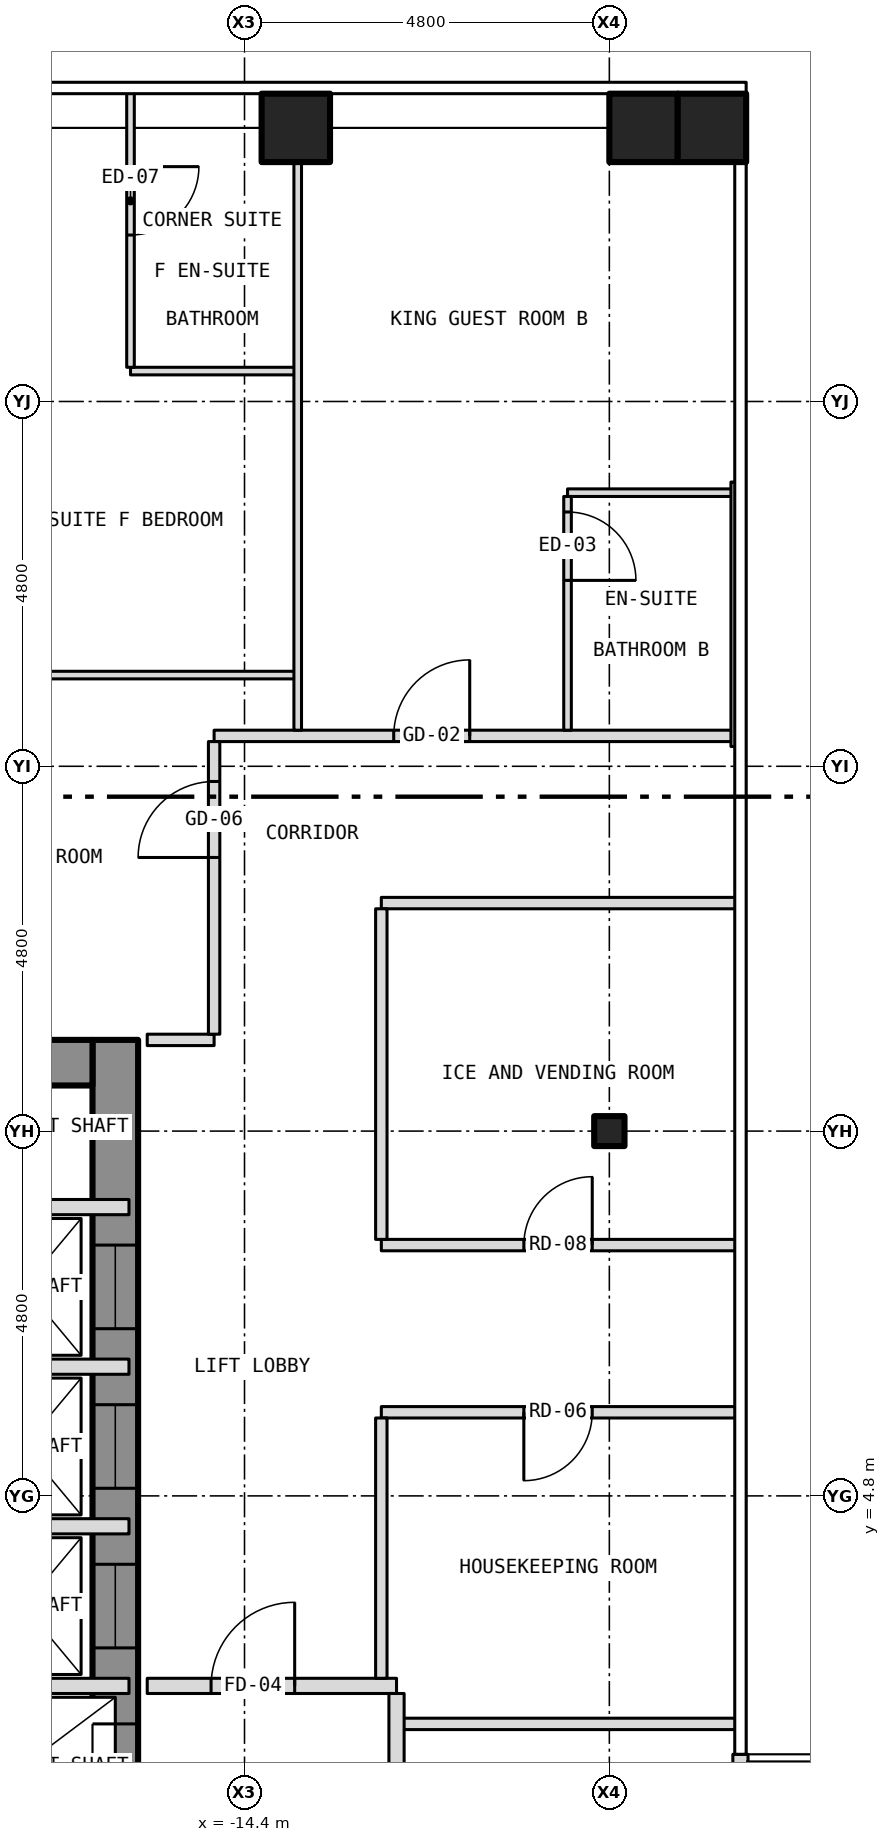
"""IFC4 building model, lengths in metres.
Left out: names, types, materials, properties, quantities, classifications, styles, units other than length and angle.
Written with IfcOpenShell. Run it as: python <this file> out.ifc"""

import sys

from ifc_helpers import new_model, si_unit, direction, frame, frame_2d, origin, origin_2d, place, context, subcontext, project, spatial, rectangle, hollow_rectangle, i_section, extrude, element, fill, save


model = new_model("IFC4")
c1 = context("Model", 3, precision=1e-05, world=origin(), true_north=direction((0.0, 1.0)))
c2 = subcontext(c1, "Body", "Model", "MODEL_VIEW")
j1 = project(units=[si_unit("LENGTHUNIT", "METRE"), si_unit("PLANEANGLEUNIT", "RADIAN")], contexts=[c1])
p1 = place(None, origin())
s1 = spatial("IfcSite", under=j1, at=p1, CompositionType="ELEMENT")
p2 = place(p1, origin())
s2 = spatial("IfcBuilding", under=s1, at=p2, CompositionType="ELEMENT")
p3 = place(p2, frame((0.0, 0.0, 127.5)))
s3 = spatial("IfcBuildingStorey", under=s2, at=p3, CompositionType="ELEMENT", Elevation=127.5)
for number, where, z_axis, x_axis in (
    (1, (-13.725, 22.8, -0.15), (0.0, 0.0, 1.0), (1.0, 0.0, 0.0)),
    (2, (-9.15, 22.8, -0.15), (0.0, 0.0, 1.0), (1.0, 0.0, 0.0)),
    (3, (-8.25, 22.8, -0.15), (0.0, 0.0, 1.0), (1.0, 0.0, 0.0)),
):
    element("IfcColumn", number, at=place(p3, frame(where, z_axis=z_axis, x_axis=x_axis)), inside=s3, PredefinedType="COLUMN", context=c2, shape_type="SweptSolid", body=[
        extrude(hollow_rectangle(XDim=0.9, YDim=0.9, WallThickness=0.05, at=origin_2d()), origin(), (0.0, 0.0, 1.0), 3.5),
    ])
p4 = place(p3, frame((-9.6, 9.6, -0.15), z_axis=(0.0, 0.0, 1.0), x_axis=(1.0, 0.0, 0.0)))
e4 = element("IfcColumn", 4, at=p4, inside=s3, PredefinedType="COLUMN", context=c2, shape_type="SweptSolid", body=[
    extrude(i_section(OverallWidth=0.399, OverallDepth=0.394, WebThickness=0.023, FlangeThickness=0.037, at=origin_2d()), origin(), (0.0, 0.0, 1.0), 3.5),
])
p5 = place(p3, frame((-16.1, -10.8, 0.0), z_axis=(0.0, 0.0, 1.0), x_axis=(0.0, 1.0, 0.0)))
e5 = element("IfcWall", 5, at=p5, inside=s3, PredefinedType="SHEAR", context=c2, shape_type="SweptSolid", body=[
    extrude(rectangle(XDim=21.6, YDim=0.6, at=frame_2d((10.8, 0.0))), origin(), (0.0, 0.0, 1.0), 3.25),
])
p6 = place(p5, frame((9.4, 0.0, 0.0)))
e6 = element("IfcOpeningElement", 6, at=p6, cuts=e5, PredefinedType="OPENING", context=c2, shape_type="SweptSolid", body=[
    extrude(rectangle(XDim=1.1, YDim=2.1, at=frame_2d((0.55, 1.05))), frame((0.0, 0.312, 0.0), z_axis=(0.0, -1.0, 0.0), x_axis=(1.0, 0.0, 0.0)), (0.0, 0.0, 1.0), 0.624),
])
p7 = place(p5, frame((11.5, 0.0, 0.0)))
e7 = element("IfcOpeningElement", 7, at=p7, cuts=e5, PredefinedType="OPENING", context=c2, shape_type="SweptSolid", body=[
    extrude(rectangle(XDim=1.1, YDim=2.1, at=frame_2d((0.55, 1.05))), frame((0.0, 0.312, 0.0), z_axis=(0.0, -1.0, 0.0), x_axis=(1.0, 0.0, 0.0)), (0.0, 0.0, 1.0), 0.624),
])
p8 = place(p5, frame((13.6, 0.0, 0.0)))
e8 = element("IfcOpeningElement", 8, at=p8, cuts=e5, PredefinedType="OPENING", context=c2, shape_type="SweptSolid", body=[
    extrude(rectangle(XDim=1.1, YDim=2.1, at=frame_2d((0.55, 1.05))), frame((0.0, 0.312, 0.0), z_axis=(0.0, -1.0, 0.0), x_axis=(1.0, 0.0, 0.0)), (0.0, 0.0, 1.0), 0.624),
])
p9 = place(p5, frame((15.7, 0.0, 0.0)))
e9 = element("IfcOpeningElement", 9, at=p9, cuts=e5, PredefinedType="OPENING", context=c2, shape_type="SweptSolid", body=[
    extrude(rectangle(XDim=1.1, YDim=2.1, at=frame_2d((0.55, 1.05))), frame((0.0, 0.312, 0.0), z_axis=(0.0, -1.0, 0.0), x_axis=(1.0, 0.0, 0.0)), (0.0, 0.0, 1.0), 0.624),
])
p10 = place(p5, frame((17.8, 0.0, 0.0)))
e10 = element("IfcOpeningElement", 10, at=p10, cuts=e5, PredefinedType="OPENING", context=c2, shape_type="SweptSolid", body=[
    extrude(rectangle(XDim=1.1, YDim=2.1, at=frame_2d((0.55, 1.05))), frame((0.0, 0.312, 0.0), z_axis=(0.0, -1.0, 0.0), x_axis=(1.0, 0.0, 0.0)), (0.0, 0.0, 1.0), 0.624),
])
p11 = place(p5, frame((0.758, 0.0, 0.0)))
e11 = element("IfcOpeningElement", 11, at=p11, cuts=e5, PredefinedType="OPENING", context=c2, shape_type="SweptSolid", body=[
    extrude(rectangle(XDim=1.1, YDim=2.1, at=frame_2d((0.55, 1.05))), frame((0.0, 0.312, 0.0), z_axis=(0.0, -1.0, 0.0), x_axis=(1.0, 0.0, 0.0)), (0.0, 0.0, 1.0), 0.624),
])
p12 = place(p5, frame((7.5, 0.0, 0.0)))
e12 = element("IfcOpeningElement", 12, at=p12, cuts=e5, PredefinedType="OPENING", context=c2, shape_type="SweptSolid", body=[
    extrude(rectangle(XDim=1.1, YDim=2.1, at=frame_2d((0.55, 1.05))), frame((0.0, 0.312, 0.0), z_axis=(0.0, -1.0, 0.0), x_axis=(1.0, 0.0, 0.0)), (0.0, 0.0, 1.0), 0.624),
])
p13 = place(p3, frame((-22.2, 10.5, 0.0), z_axis=(0.0, 0.0, 1.0), x_axis=(1.0, 0.0, 0.0)))
e13 = element("IfcWall", 13, at=p13, inside=s3, PredefinedType="SHEAR", context=c2, shape_type="SweptSolid", body=[
    extrude(rectangle(XDim=5.8, YDim=0.6, at=frame_2d((2.9, 0.0))), origin(), (0.0, 0.0, 1.0), 3.25),
])
p14 = place(p3, frame((-7.875, -1.4, 0.0), z_axis=(0.0, 0.0, 1.0), x_axis=(0.0, 1.0, 0.0)))
e14 = element("IfcWall", 14, at=p14, inside=s3, PredefinedType="SOLIDWALL", context=c2, shape_type="SweptSolid", body=[
    extrude(rectangle(XDim=2.8, YDim=0.2, at=frame_2d((1.4, 0.0))), origin(), (0.0, 0.0, 1.0), 3.5),
])
p15 = place(p14, frame((0.5, 0.0, 0.0)))
e15 = element("IfcOpeningElement", 15, at=p15, cuts=e14, PredefinedType="OPENING", context=c2, shape_type="SweptSolid", body=[
    extrude(rectangle(XDim=1.8, YDim=2.1, at=frame_2d((0.9, 1.05))), frame((0.0, 0.112, 0.0), z_axis=(0.0, -1.0, 0.0), x_axis=(1.0, 0.0, 0.0)), (0.0, 0.0, 1.0), 0.224),
])
p16 = place(p3, frame((-12.4, 1.8, 0.0), z_axis=(0.0, 0.0, 1.0), x_axis=(1.0, 0.0, 0.0)))
e16 = element("IfcWall", 16, at=p16, inside=s3, PredefinedType="PARTITIONING", context=c2, shape_type="SweptSolid", body=[
    extrude(rectangle(XDim=4.48, YDim=0.15, at=frame_2d((2.24, 0.0))), origin(), (0.0, 0.0, 1.0), 3.35),
])
p17 = place(p3, frame((-18.8, 2.3, 0.0), z_axis=(0.0, 0.0, 1.0), x_axis=(1.0, 0.0, 0.0)))
e17 = element("IfcWall", 17, at=p17, inside=s3, PredefinedType="PARTITIONING", context=c2, shape_type="SweptSolid", body=[
    extrude(rectangle(XDim=2.88, YDim=0.2, at=frame_2d((1.44, 0.0))), origin(), (0.0, 0.0, 1.0), 3.25),
])
p18 = place(p3, frame((-15.68, 2.3, 0.0), z_axis=(0.0, 0.0, 1.0), x_axis=(1.0, 0.0, 0.0)))
e18 = element("IfcWall", 18, at=p18, inside=s3, PredefinedType="PARTITIONING", context=c2, shape_type="SweptSolid", body=[
    extrude(rectangle(XDim=3.28, YDim=0.2, at=frame_2d((1.64, 0.0))), origin(), (0.0, 0.0, 1.0), 3.35),
])
p19 = place(p18, frame((0.84, 0.0, 0.0)))
e19 = element("IfcOpeningElement", 19, at=p19, cuts=e18, PredefinedType="OPENING", context=c2, shape_type="SweptSolid", body=[
    extrude(rectangle(XDim=1.1, YDim=2.1, at=frame_2d((0.55, 1.05))), frame((0.0, 0.112, 0.0), z_axis=(0.0, -1.0, 0.0), x_axis=(1.0, 0.0, 0.0)), (0.0, 0.0, 1.0), 0.224),
])
p20 = place(p3, frame((-18.8, 4.4, 0.0), z_axis=(0.0, 0.0, 1.0), x_axis=(1.0, 0.0, 0.0)))
e20 = element("IfcWall", 20, at=p20, inside=s3, PredefinedType="PARTITIONING", context=c2, shape_type="SweptSolid", body=[
    extrude(rectangle(XDim=2.88, YDim=0.2, at=frame_2d((1.44, 0.0))), origin(), (0.0, 0.0, 1.0), 3.25),
])
p21 = place(p3, frame((-12.6, 5.9, 0.0), z_axis=(0.0, 0.0, 1.0), x_axis=(1.0, 0.0, 0.0)))
e21 = element("IfcWall", 21, at=p21, inside=s3, PredefinedType="PARTITIONING", context=c2, shape_type="SweptSolid", body=[
    extrude(rectangle(XDim=4.68, YDim=0.15, at=frame_2d((2.34, 0.0))), origin(), (0.0, 0.0, 1.0), 3.35),
])
p22 = place(p21, frame((1.875, 0.0, 0.0)))
e22 = element("IfcOpeningElement", 22, at=p22, cuts=e21, PredefinedType="OPENING", context=c2, shape_type="SweptSolid", body=[
    extrude(rectangle(XDim=0.9, YDim=2.1, at=frame_2d((0.45, 1.05))), frame((0.0, 0.087, 0.0), z_axis=(0.0, -1.0, 0.0), x_axis=(1.0, 0.0, 0.0)), (0.0, 0.0, 1.0), 0.174),
])
p23 = place(p3, frame((-18.8, 6.5, 0.0), z_axis=(0.0, 0.0, 1.0), x_axis=(1.0, 0.0, 0.0)))
e23 = element("IfcWall", 23, at=p23, inside=s3, PredefinedType="PARTITIONING", context=c2, shape_type="SweptSolid", body=[
    extrude(rectangle(XDim=2.88, YDim=0.2, at=frame_2d((1.44, 0.0))), origin(), (0.0, 0.0, 1.0), 3.25),
])
p24 = place(p3, frame((-12.6, 8.1, 0.0), z_axis=(0.0, 0.0, 1.0), x_axis=(1.0, 0.0, 0.0)))
e24 = element("IfcWall", 24, at=p24, inside=s3, PredefinedType="PARTITIONING", context=c2, shape_type="SweptSolid", body=[
    extrude(rectangle(XDim=4.68, YDim=0.15, at=frame_2d((2.34, 0.0))), origin(), (0.0, 0.0, 1.0), 3.35),
])
p25 = place(p24, frame((1.875, 0.0, 0.0)))
e25 = element("IfcOpeningElement", 25, at=p25, cuts=e24, PredefinedType="OPENING", context=c2, shape_type="SweptSolid", body=[
    extrude(rectangle(XDim=0.9, YDim=2.1, at=frame_2d((0.45, 1.05))), frame((0.0, 0.087, 0.0), z_axis=(0.0, -1.0, 0.0), x_axis=(1.0, 0.0, 0.0)), (0.0, 0.0, 1.0), 0.174),
])
p26 = place(p3, frame((-18.8, 8.6, 0.0), z_axis=(0.0, 0.0, 1.0), x_axis=(1.0, 0.0, 0.0)))
e26 = element("IfcWall", 26, at=p26, inside=s3, PredefinedType="PARTITIONING", context=c2, shape_type="SweptSolid", body=[
    extrude(rectangle(XDim=2.88, YDim=0.2, at=frame_2d((1.44, 0.0))), origin(), (0.0, 0.0, 1.0), 3.25),
])
p27 = place(p3, frame((-15.68, 10.8, 0.0), z_axis=(0.0, 0.0, 1.0), x_axis=(1.0, 0.0, 0.0)))
e27 = element("IfcWall", 27, at=p27, inside=s3, PredefinedType="PARTITIONING", context=c2, shape_type="SweptSolid", body=[
    extrude(rectangle(XDim=0.88, YDim=0.15, at=frame_2d((0.44, 0.0))), origin(), (0.0, 0.0, 1.0), 3.35),
])
p28 = place(p3, frame((-12.6, 12.6, 0.0), z_axis=(0.0, 0.0, 1.0), x_axis=(1.0, 0.0, 0.0)))
e28 = element("IfcWall", 28, at=p28, inside=s3, PredefinedType="PARTITIONING", context=c2, shape_type="SweptSolid", body=[
    extrude(rectangle(XDim=4.68, YDim=0.15, at=frame_2d((2.34, 0.0))), origin(), (0.0, 0.0, 1.0), 3.35),
])
p29 = place(p3, frame((-14.8, 14.8, 0.0), z_axis=(0.0, 0.0, 1.0), x_axis=(1.0, 0.0, 0.0)))
e29 = element("IfcWall", 29, at=p29, inside=s3, PredefinedType="PARTITIONING", context=c2, shape_type="SweptSolid", body=[
    extrude(rectangle(XDim=6.85, YDim=0.15, at=frame_2d((3.425, 0.0))), origin(), (0.0, 0.0, 1.0), 3.35),
])
p30 = place(p29, frame((2.363, 0.0, 0.0)))
e30 = element("IfcOpeningElement", 30, at=p30, cuts=e29, PredefinedType="OPENING", context=c2, shape_type="SweptSolid", body=[
    extrude(rectangle(XDim=1.0, YDim=2.1, at=frame_2d((0.5, 1.05))), frame((0.0, 0.087, 0.0), z_axis=(0.0, -1.0, 0.0), x_axis=(1.0, 0.0, 0.0)), (0.0, 0.0, 1.0), 0.174),
])
p31 = place(p3, frame((-23.28, 15.6, 0.0), z_axis=(0.0, 0.0, 1.0), x_axis=(1.0, 0.0, 0.0)))
e31 = element("IfcWall", 31, at=p31, inside=s3, PredefinedType="PARTITIONING", context=c2, shape_type="SweptSolid", body=[
    extrude(rectangle(XDim=9.58, YDim=0.1, at=frame_2d((4.79, 0.0))), origin(), (0.0, 0.0, 1.0), 3.35),
])
p32 = place(p31, frame((4.568, 0.0, 0.0)))
e32 = element("IfcOpeningElement", 32, at=p32, cuts=e31, PredefinedType="OPENING", context=c2, shape_type="SweptSolid", body=[
    extrude(rectangle(XDim=0.9, YDim=2.1, at=frame_2d((0.45, 1.05))), frame((0.0, 0.062, 0.0), z_axis=(0.0, -1.0, 0.0), x_axis=(1.0, 0.0, 0.0)), (0.0, 0.0, 1.0), 0.124),
])
for number, where, z_axis, x_axis in (
    (33, (-10.15, 18.0, 0.0), (0.0, 0.0, 1.0), (1.0, 0.0, 0.0)),
    (34, (-15.9, 19.6, 0.0), (0.0, 0.0, 1.0), (1.0, 0.0, 0.0)),
):
    element("IfcWall", number, at=place(p3, frame(where, z_axis=z_axis, x_axis=x_axis)), inside=s3, PredefinedType="PARTITIONING", context=c2, shape_type="SweptSolid", body=[
        extrude(rectangle(XDim=2.2, YDim=0.1, at=frame_2d((1.1, 0.0))), origin(), (0.0, 0.0, 1.0), 3.35),
    ])
p33 = place(p3, frame((-15.9, 19.65, 0.0), z_axis=(0.0, 0.0, 1.0), x_axis=(0.0, 1.0, 0.0)))
e35 = element("IfcWall", 35, at=p33, inside=s3, PredefinedType="PARTITIONING", context=c2, shape_type="SweptSolid", body=[
    extrude(rectangle(XDim=3.63, YDim=0.1, at=frame_2d((1.815, 0.0))), origin(), (0.0, 0.0, 1.0), 3.35),
])
p34 = place(p33, frame((1.74, 0.0, 0.0)))
e36 = element("IfcOpeningElement", 36, at=p34, cuts=e35, PredefinedType="OPENING", context=c2, shape_type="SweptSolid", body=[
    extrude(rectangle(XDim=0.9, YDim=2.1, at=frame_2d((0.45, 1.05))), frame((0.0, 0.062, 0.0), z_axis=(0.0, -1.0, 0.0), x_axis=(1.0, 0.0, 0.0)), (0.0, 0.0, 1.0), 0.124),
])
p35 = place(p3, frame((-14.8, 10.875, 0.0), z_axis=(0.0, 0.0, 1.0), x_axis=(0.0, 1.0, 0.0)))
e37 = element("IfcWall", 37, at=p35, inside=s3, PredefinedType="PARTITIONING", context=c2, shape_type="SweptSolid", body=[
    extrude(rectangle(XDim=3.85, YDim=0.15, at=frame_2d((1.925, 0.0))), origin(), (0.0, 0.0, 1.0), 3.35),
])
p36 = place(p35, frame((2.325, 0.0, 0.0)))
e38 = element("IfcOpeningElement", 38, at=p36, cuts=e37, PredefinedType="OPENING", context=c2, shape_type="SweptSolid", body=[
    extrude(rectangle(XDim=1.0, YDim=2.1, at=frame_2d((0.5, 1.05))), frame((0.0, 0.087, 0.0), z_axis=(0.0, -1.0, 0.0), x_axis=(1.0, 0.0, 0.0)), (0.0, 0.0, 1.0), 0.174),
])
p37 = place(p3, frame((-13.7, 14.875, 0.0), z_axis=(0.0, 0.0, 1.0), x_axis=(0.0, 1.0, 0.0)))
e39 = element("IfcWall", 39, at=p37, inside=s3, PredefinedType="PARTITIONING", context=c2, shape_type="SweptSolid", body=[
    extrude(rectangle(XDim=7.805, YDim=0.1, at=frame_2d((3.902, 0.0))), origin(), (0.0, 0.0, 1.0), 3.35),
])
p38 = place(p3, frame((-12.6, 2.4, 0.0), z_axis=(0.0, 0.0, 1.0), x_axis=(0.0, 1.0, 0.0)))
e40 = element("IfcWall", 40, at=p38, inside=s3, PredefinedType="PARTITIONING", context=c2, shape_type="SweptSolid", body=[
    extrude(rectangle(XDim=3.425, YDim=0.15, at=frame_2d((1.712, 0.0))), origin(), (0.0, 0.0, 1.0), 3.35),
])
p39 = place(p3, frame((-12.6, 8.175, 0.0), z_axis=(0.0, 0.0, 1.0), x_axis=(0.0, 1.0, 0.0)))
e41 = element("IfcWall", 41, at=p39, inside=s3, PredefinedType="PARTITIONING", context=c2, shape_type="SweptSolid", body=[
    extrude(rectangle(XDim=4.35, YDim=0.15, at=frame_2d((2.175, 0.0))), origin(), (0.0, 0.0, 1.0), 3.35),
])
p40 = place(p3, frame((-12.4, -1.8, 0.0), z_axis=(0.0, 0.0, 1.0), x_axis=(0.0, 1.0, 0.0)))
e42 = element("IfcWall", 42, at=p40, inside=s3, PredefinedType="PARTITIONING", context=c2, shape_type="SweptSolid", body=[
    extrude(rectangle(XDim=4.0, YDim=0.2, at=frame_2d((2.0, 0.0))), origin(), (0.0, 0.0, 1.0), 3.35),
])
p41 = place(p40, frame((1.25, 0.0, 0.0)))
e43 = element("IfcOpeningElement", 43, at=p41, cuts=e42, PredefinedType="OPENING", context=c2, shape_type="SweptSolid", body=[
    extrude(rectangle(XDim=1.1, YDim=2.1, at=frame_2d((0.55, 1.05))), frame((0.0, 0.112, 0.0), z_axis=(0.0, -1.0, 0.0), x_axis=(1.0, 0.0, 0.0)), (0.0, 0.0, 1.0), 0.224),
])
p42 = place(p3, frame((-10.15, 14.875, 0.0), z_axis=(0.0, 0.0, 1.0), x_axis=(0.0, 1.0, 0.0)))
e44 = element("IfcWall", 44, at=p42, inside=s3, PredefinedType="PARTITIONING", context=c2, shape_type="SweptSolid", body=[
    extrude(rectangle(XDim=3.075, YDim=0.1, at=frame_2d((1.538, 0.0))), origin(), (0.0, 0.0, 1.0), 3.35),
])
p43 = place(p42, frame((1.971, 0.0, 0.0)))
e45 = element("IfcOpeningElement", 45, at=p43, cuts=e44, PredefinedType="OPENING", context=c2, shape_type="SweptSolid", body=[
    extrude(rectangle(XDim=0.9, YDim=2.1, at=frame_2d((0.45, 1.05))), frame((0.0, 0.062, 0.0), z_axis=(0.0, -1.0, 0.0), x_axis=(1.0, 0.0, 0.0)), (0.0, 0.0, 1.0), 0.124),
])
p44 = place(p3, frame((-7.95, 14.66, 0.0), z_axis=(0.0, 0.0, 1.0), x_axis=(0.0, 1.0, 0.0)))
e46 = element("IfcWall", 46, at=p44, inside=s3, PredefinedType="PARTITIONING", context=c2, shape_type="SweptSolid", body=[
    extrude(rectangle(XDim=3.48, YDim=0.1, at=frame_2d((1.74, 0.0))), origin(), (0.0, 0.0, 1.0), 2.733),
])
p45 = place(p7, origin())
e47 = element("IfcDoor", 47, at=p45, inside=s3, OperationType="SLIDING_TO_LEFT", PredefinedType="DOOR", context=c2, shape_type="SweptSolid", body=[
    extrude(rectangle(XDim=1.1, YDim=2.1, at=frame_2d((0.55, 1.05))), frame((0.0, 0.025, 0.0), z_axis=(0.0, -1.0, 0.0), x_axis=(1.0, 0.0, 0.0)), (0.0, 0.0, 1.0), 0.05),
])
fill(e7, e47)
p46 = place(p8, origin())
e48 = element("IfcDoor", 48, at=p46, inside=s3, OperationType="SLIDING_TO_LEFT", PredefinedType="DOOR", context=c2, shape_type="SweptSolid", body=[
    extrude(rectangle(XDim=1.1, YDim=2.1, at=frame_2d((0.55, 1.05))), frame((0.0, 0.025, 0.0), z_axis=(0.0, -1.0, 0.0), x_axis=(1.0, 0.0, 0.0)), (0.0, 0.0, 1.0), 0.05),
])
fill(e8, e48)
p47 = place(p9, origin())
e49 = element("IfcDoor", 49, at=p47, inside=s3, OperationType="SLIDING_TO_LEFT", PredefinedType="DOOR", context=c2, shape_type="SweptSolid", body=[
    extrude(rectangle(XDim=1.1, YDim=2.1, at=frame_2d((0.55, 1.05))), frame((0.0, 0.025, 0.0), z_axis=(0.0, -1.0, 0.0), x_axis=(1.0, 0.0, 0.0)), (0.0, 0.0, 1.0), 0.05),
])
fill(e9, e49)
p48 = place(p10, origin())
e50 = element("IfcDoor", 50, at=p48, inside=s3, OperationType="SLIDING_TO_LEFT", PredefinedType="DOOR", context=c2, shape_type="SweptSolid", body=[
    extrude(rectangle(XDim=1.1, YDim=2.1, at=frame_2d((0.55, 1.05))), frame((0.0, 0.025, 0.0), z_axis=(0.0, -1.0, 0.0), x_axis=(1.0, 0.0, 0.0)), (0.0, 0.0, 1.0), 0.05),
])
fill(e10, e50)
p49 = place(p19, origin())
e51 = element("IfcDoor", 51, at=p49, inside=s3, OperationType="SINGLE_SWING_RIGHT", PredefinedType="DOOR", context=c2, shape_type="SweptSolid", body=[
    extrude(rectangle(XDim=1.1, YDim=2.1, at=frame_2d((0.55, 1.05))), frame((0.0, 0.025, 0.0), z_axis=(0.0, -1.0, 0.0), x_axis=(1.0, 0.0, 0.0)), (0.0, 0.0, 1.0), 0.05),
])
fill(e19, e51)
p50 = place(p30, origin())
e52 = element("IfcDoor", 52, at=p50, inside=s3, OperationType="SINGLE_SWING_RIGHT", PredefinedType="DOOR", context=c2, shape_type="SweptSolid", body=[
    extrude(rectangle(XDim=1.0, YDim=2.1, at=frame_2d((0.5, 1.05))), frame((0.0, 0.025, 0.0), z_axis=(0.0, -1.0, 0.0), x_axis=(1.0, 0.0, 0.0)), (0.0, 0.0, 1.0), 0.05),
])
fill(e30, e52)
p51 = place(p43, origin())
e53 = element("IfcDoor", 53, at=p51, inside=s3, OperationType="SINGLE_SWING_LEFT", PredefinedType="DOOR", context=c2, shape_type="SweptSolid", body=[
    extrude(rectangle(XDim=0.9, YDim=2.1, at=frame_2d((0.45, 1.05))), frame((0.0, 0.025, 0.0), z_axis=(0.0, -1.0, 0.0), x_axis=(1.0, 0.0, 0.0)), (0.0, 0.0, 1.0), 0.05),
])
fill(e45, e53)
p52 = place(p36, origin())
e54 = element("IfcDoor", 54, at=p52, inside=s3, OperationType="SINGLE_SWING_LEFT", PredefinedType="DOOR", context=c2, shape_type="SweptSolid", body=[
    extrude(rectangle(XDim=1.0, YDim=2.1, at=frame_2d((0.5, 1.05))), frame((0.0, 0.025, 0.0), z_axis=(0.0, -1.0, 0.0), x_axis=(1.0, 0.0, 0.0)), (0.0, 0.0, 1.0), 0.05),
])
fill(e38, e54)
p53 = place(p34, origin())
e55 = element("IfcDoor", 55, at=p53, inside=s3, OperationType="SINGLE_SWING_RIGHT", PredefinedType="DOOR", context=c2, shape_type="SweptSolid", body=[
    extrude(rectangle(XDim=0.9, YDim=2.1, at=frame_2d((0.45, 1.05))), frame((0.0, 0.025, 0.0), z_axis=(0.0, -1.0, 0.0), x_axis=(1.0, 0.0, 0.0)), (0.0, 0.0, 1.0), 0.05),
])
fill(e36, e55)
p54 = place(p22, origin())
e56 = element("IfcDoor", 56, at=p54, inside=s3, OperationType="SINGLE_SWING_LEFT", PredefinedType="DOOR", context=c2, shape_type="SweptSolid", body=[
    extrude(rectangle(XDim=0.9, YDim=2.1, at=frame_2d((0.45, 1.05))), frame((0.0, 0.025, 0.0), z_axis=(0.0, -1.0, 0.0), x_axis=(1.0, 0.0, 0.0)), (0.0, 0.0, 1.0), 0.05),
])
fill(e22, e56)
p55 = place(p25, origin())
e57 = element("IfcDoor", 57, at=p55, inside=s3, OperationType="SINGLE_SWING_RIGHT", PredefinedType="DOOR", context=c2, shape_type="SweptSolid", body=[
    extrude(rectangle(XDim=0.9, YDim=2.1, at=frame_2d((0.45, 1.05))), frame((0.0, 0.025, 0.0), z_axis=(0.0, -1.0, 0.0), x_axis=(1.0, 0.0, 0.0)), (0.0, 0.0, 1.0), 0.05),
])
fill(e25, e57)
save(model, sys.argv[1])
